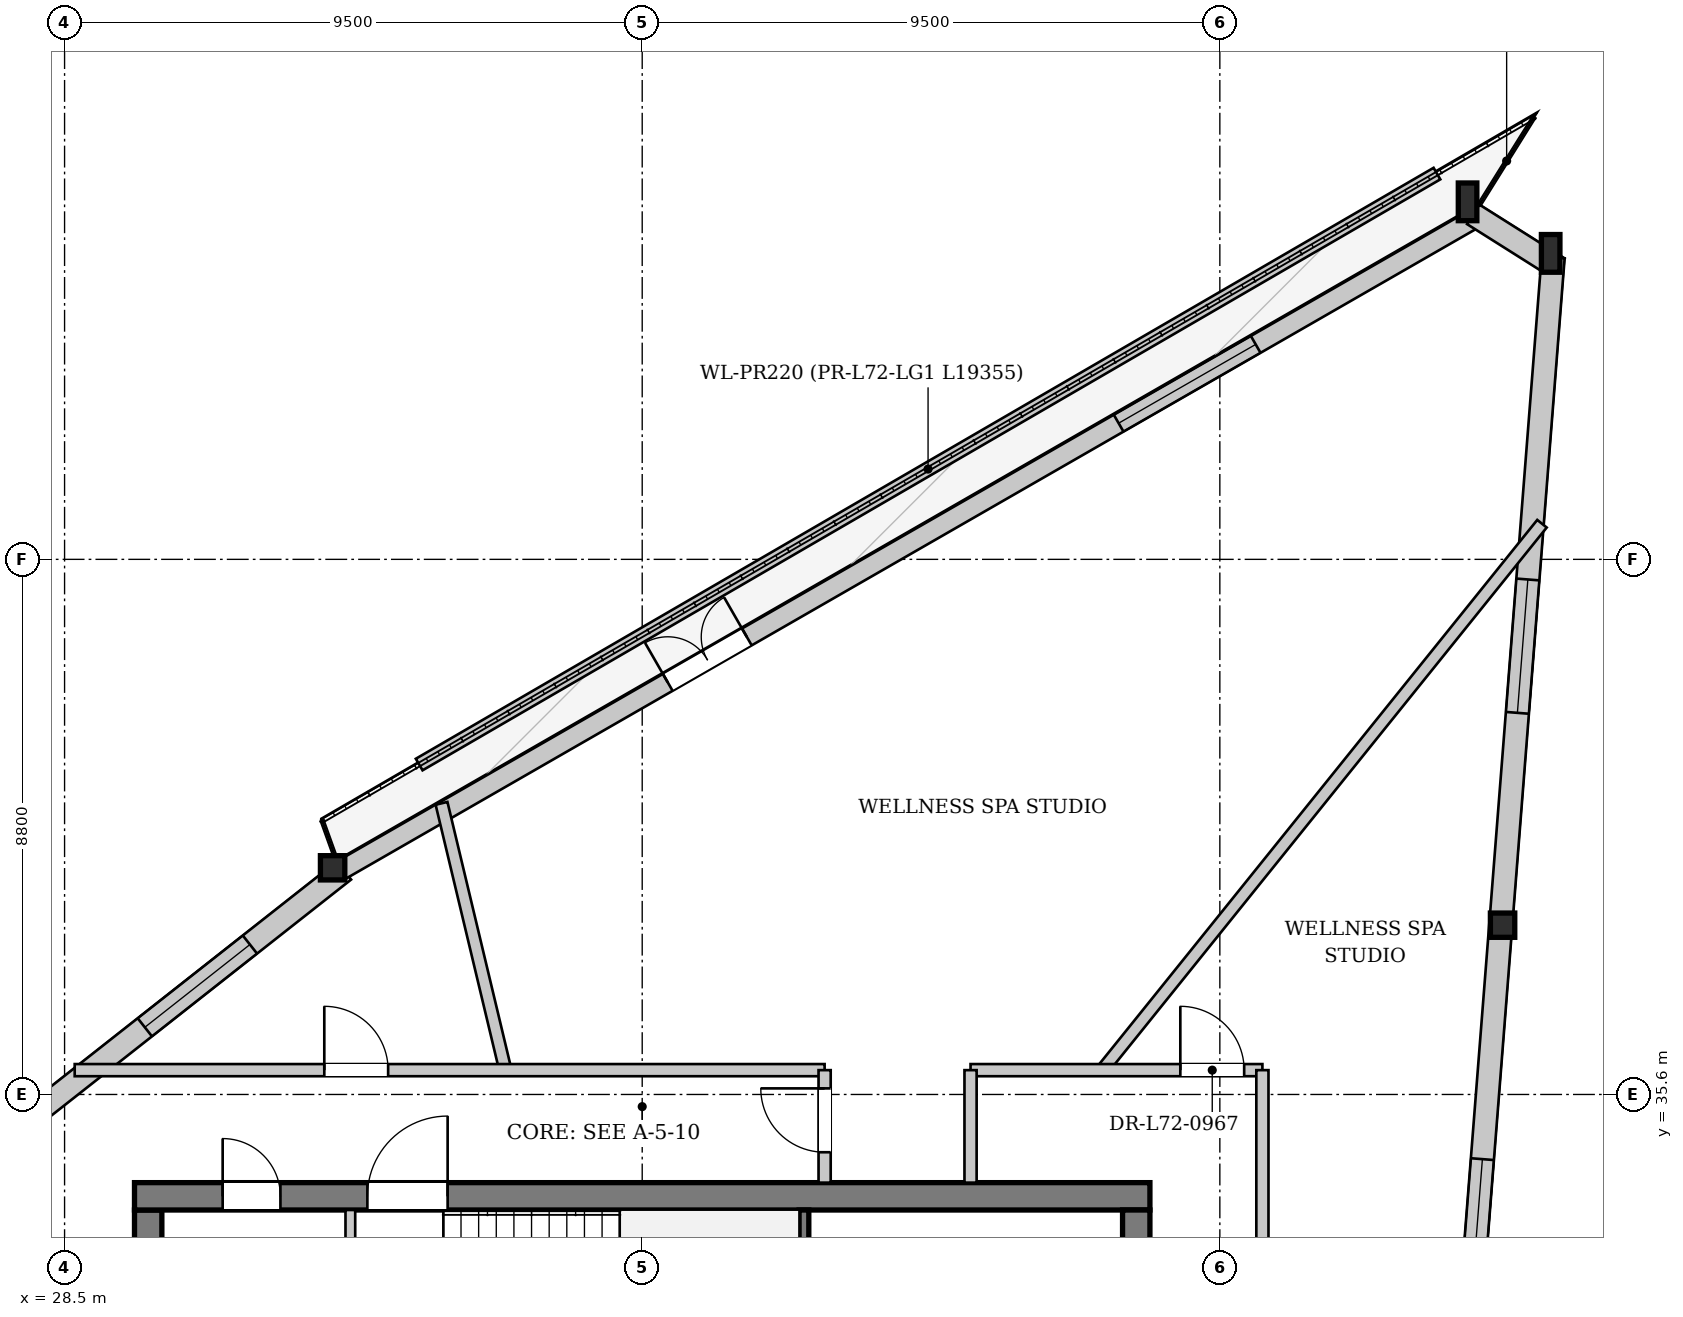
"""IFC4 building model, lengths in metres.
Left out: names, types, materials, properties, quantities, classifications, styles, units other than length and angle.
Written with IfcOpenShell. Run it as: python <this file> out.ifc"""

import sys

from ifc_helpers import new_model, si_unit, direction, frame, frame_2d, origin, origin_2d, place, context, subcontext, project, spatial, rectangle, i_section, extrude, source, transform, mapped, element, fill, save


model = new_model("IFC4")
c1 = context("Model", 3, precision=1e-05, world=origin(), true_north=direction((0.0, 1.0)))
c2 = subcontext(c1, "Body", "Model", "MODEL_VIEW")
j1 = project(units=[si_unit("LENGTHUNIT", "METRE"), si_unit("PLANEANGLEUNIT", "RADIAN")], contexts=[c1])
p1 = place(None, origin())
s1 = spatial("IfcSite", under=j1, at=p1, CompositionType="ELEMENT")
p2 = place(p1, origin())
s2 = spatial("IfcBuilding", under=s1, at=p2, CompositionType="ELEMENT")
p3 = place(p2, frame((0.0, 0.0, 270.5)))
s3 = spatial("IfcBuildingStorey", under=s2, at=p3, CompositionType="ELEMENT", Elevation=270.5)
m1 = source(origin(), c2, "Body", "SweptSolid", [
    extrude(i_section(OverallWidth=0.305, OverallDepth=0.62, WebThickness=0.021, FlangeThickness=0.04, at=origin_2d()), origin(), (0.0, 0.0, 1.0), 3.469),
])
p4 = place(p3, frame((53.17, 49.35, 0.0), z_axis=(-0.132362438107, 0.047146641963, 0.990079481218), x_axis=(-0.335543138669, -0.942024841547, 0.0)))
e1 = element("IfcColumn", 1, at=p4, inside=s3, PredefinedType="COLUMN", context=c2, shape_type="MappedRepresentation", body=[
    mapped(m1, transform((0.0, 0.0, 0.0), x_axis=(1.0, 0.0, 0.0), y_axis=(0.0, 1.0, 0.0), z_axis=(0.0, 0.0, 1.0), scale=1.0)),
])
m2 = source(origin(), c2, "Body", "SweptSolid", [
    extrude(i_section(OverallWidth=0.305, OverallDepth=0.62, WebThickness=0.021, FlangeThickness=0.04, at=origin_2d()), origin(), (0.0, 0.0, 1.0), 3.458),
])
p5 = place(p3, frame((51.769, 50.234, 0.0), z_axis=(-0.112532172855, 0.026121018793, 0.993304687621), x_axis=(-0.226108997979, -0.974102007509, 0.0)))
e2 = element("IfcColumn", 2, at=p5, inside=s3, PredefinedType="COLUMN", context=c2, shape_type="MappedRepresentation", body=[
    mapped(m2, transform((0.0, 0.0, 0.0), x_axis=(1.0, 0.0, 0.0), y_axis=(0.0, 1.0, 0.0), z_axis=(0.0, 0.0, 1.0), scale=1.0)),
])
m3 = source(origin(), c2, "Body", "SweptSolid", [
    extrude(i_section(OverallWidth=0.401, OverallDepth=0.399, WebThickness=0.022, FlangeThickness=0.034, at=origin_2d()), origin(), (0.0, 0.0, 1.0), 3.444),
])
p6 = place(p3, frame((32.978, 39.433, 0.0), z_axis=(-0.040261534601, -0.061030248752, 0.997323577165), x_axis=(0.834725272297, -0.550666614013, 0.0)))
e3 = element("IfcColumn", 3, at=p6, inside=s3, PredefinedType="COLUMN", context=c2, shape_type="MappedRepresentation", body=[
    mapped(m3, transform((0.0, 0.0, 0.0), x_axis=(1.0, 0.0, 0.0), y_axis=(0.0, 1.0, 0.0), z_axis=(0.0, 0.0, 1.0), scale=1.0)),
])
m4 = source(origin(), c2, "Body", "SweptSolid", [
    extrude(i_section(OverallWidth=0.401, OverallDepth=0.399, WebThickness=0.022, FlangeThickness=0.034, at=origin_2d()), origin(), (0.0, 0.0, 1.0), 3.454),
])
p7 = place(p3, frame((52.303, 38.291, 0.0), z_axis=(-0.088644016049, 0.05407709113, 0.994594342752), x_axis=(-0.520788970814, -0.853685450197, 0.0)))
e4 = element("IfcColumn", 4, at=p7, inside=s3, PredefinedType="COLUMN", context=c2, shape_type="MappedRepresentation", body=[
    mapped(m4, transform((0.0, 0.0, 0.0), x_axis=(1.0, 0.0, 0.0), y_axis=(0.0, 1.0, 0.0), z_axis=(0.0, 0.0, 1.0), scale=1.0)),
])
p8 = place(p3, frame((16.066, 25.875, 0.0), z_axis=(0.0, 0.0, 1.0), x_axis=(0.785693730349, 0.61861568206, 0.0)))
e5 = element("IfcWall", 5, at=p8, inside=s3, PredefinedType="SOLIDWALL", context=c2, shape_type="SweptSolid", body=[
    extrude(rectangle(XDim=21.675, YDim=0.38, at=frame_2d((10.837, 0.0))), origin(), (0.0, 0.0, 1.0), 2.872),
])
p9 = place(p8, frame((4.969, 0.0, 0.502)))
e6 = element("IfcOpeningElement", 6, at=p9, cuts=e5, PredefinedType="OPENING", context=c2, shape_type="SweptSolid", body=[
    extrude(rectangle(XDim=2.2, YDim=2.25, at=frame_2d((1.1, 1.125))), frame((0.0, 0.2, 0.0), z_axis=(0.0, -1.0, 0.0), x_axis=(1.0, 0.0, 0.0)), (0.0, 0.0, 1.0), 0.4),
])
p10 = place(p8, frame((17.506, 0.0, 0.502)))
e7 = element("IfcOpeningElement", 7, at=p10, cuts=e5, PredefinedType="OPENING", context=c2, shape_type="SweptSolid", body=[
    extrude(rectangle(XDim=2.2, YDim=2.25, at=frame_2d((1.1, 1.125))), frame((0.0, 0.2, 0.0), z_axis=(0.0, -1.0, 0.0), x_axis=(1.0, 0.0, 0.0)), (0.0, 0.0, 1.0), 0.4),
])
p11 = place(p3, frame((33.057, 39.294, 0.0), z_axis=(0.0, 0.0, 1.0), x_axis=(0.866967626838, 0.49836445902, 0.0)))
e8 = element("IfcWall", 8, at=p11, inside=s3, PredefinedType="SOLIDWALL", context=c2, shape_type="SweptSolid", body=[
    extrude(rectangle(XDim=21.674, YDim=0.32, at=frame_2d((10.837, 0.0))), origin(), (0.0, 0.0, 1.0), 2.872),
])
p12 = place(p11, frame((6.186, 0.0, 0.0)))
e9 = element("IfcOpeningElement", 9, at=p12, cuts=e8, PredefinedType="OPENING", context=c2, shape_type="SweptSolid", body=[
    extrude(rectangle(XDim=1.5, YDim=2.3, at=frame_2d((0.75, 1.15))), frame((0.0, 0.17, 0.0), z_axis=(0.0, -1.0, 0.0), x_axis=(1.0, 0.0, 0.0)), (0.0, 0.0, 1.0), 0.34),
])
p13 = place(p11, frame((14.739, 0.0, 0.402)))
e10 = element("IfcOpeningElement", 10, at=p13, cuts=e8, PredefinedType="OPENING", context=c2, shape_type="SweptSolid", body=[
    extrude(rectangle(XDim=2.6, YDim=2.35, at=frame_2d((1.3, 1.175))), frame((0.0, 0.17, 0.0), z_axis=(0.0, -1.0, 0.0), x_axis=(1.0, 0.0, 0.0)), (0.0, 0.0, 1.0), 0.34),
])
p14 = place(p3, frame((51.667, 50.073, 0.0), z_axis=(0.0, 0.0, 1.0), x_axis=(0.845747848384, -0.533582774229, 0.0)))
e11 = element("IfcWall", 11, at=p14, inside=s3, PredefinedType="SOLIDWALL", context=c2, shape_type="SweptSolid", body=[
    extrude(rectangle(XDim=1.657, YDim=0.38, at=frame_2d((0.829, 0.0))), origin(), (0.0, 0.0, 1.0), 2.872),
])
p15 = place(p3, frame((52.981, 49.365, 0.0), z_axis=(0.0, 0.0, 1.0), x_axis=(-0.078193389746, -0.99693820962, 0.0)))
e12 = element("IfcWall", 12, at=p15, inside=s3, PredefinedType="SOLIDWALL", context=c2, shape_type="SweptSolid", body=[
    extrude(rectangle(XDim=22.187, YDim=0.38, at=frame_2d((11.093, 0.0))), origin(), (0.0, 0.0, 1.0), 2.872),
])
p16 = place(p15, frame((5.312, 0.0, 0.502)))
e13 = element("IfcOpeningElement", 13, at=p16, cuts=e12, PredefinedType="OPENING", context=c2, shape_type="SweptSolid", body=[
    extrude(rectangle(XDim=2.2, YDim=2.25, at=frame_2d((1.1, 1.125))), frame((0.0, 0.2, 0.0), z_axis=(0.0, -1.0, 0.0), x_axis=(1.0, 0.0, 0.0)), (0.0, 0.0, 1.0), 0.4),
])
p17 = place(p15, frame((14.874, 0.0, 0.502)))
e14 = element("IfcOpeningElement", 14, at=p17, cuts=e12, PredefinedType="OPENING", context=c2, shape_type="SweptSolid", body=[
    extrude(rectangle(XDim=2.2, YDim=2.25, at=frame_2d((1.1, 1.125))), frame((0.0, 0.2, 0.0), z_axis=(0.0, -1.0, 0.0), x_axis=(1.0, 0.0, 0.0)), (0.0, 0.0, 1.0), 0.4),
])
p18 = place(p3, frame((51.071, 50.744, 0.0), z_axis=(0.0, 0.0, 1.0), x_axis=(-0.864808735234, -0.502101435433, 0.0)))
e15 = element("IfcWall", 15, at=p18, inside=s3, PredefinedType="PARAPET", context=c2, shape_type="SweptSolid", body=[
    extrude(rectangle(XDim=19.355, YDim=0.22, at=frame_2d((9.678, 0.0))), origin(), (0.0, 0.0, 1.0), 0.3),
])
p19 = place(p3, frame((29.875, 19.5, 0.0), z_axis=(0.0, 0.0, 1.0), x_axis=(0.0, 1.0, 0.0)))
e16 = element("IfcWall", 16, at=p19, inside=s3, PredefinedType="SHEAR", context=c2, shape_type="SweptSolid", body=[
    extrude(rectangle(XDim=14.2, YDim=0.45, at=frame_2d((7.1, 0.0))), origin(), (0.0, 0.0, 1.0), 3.38),
])
p20 = place(p19, frame((7.42, 0.0, 0.0)))
e17 = element("IfcOpeningElement", 17, at=p20, cuts=e16, PredefinedType="OPENING", context=c2, shape_type="SweptSolid", body=[
    extrude(rectangle(XDim=1.6, YDim=2.2, at=frame_2d((0.8, 1.1))), frame((0.0, 0.235, 0.0), z_axis=(0.0, -1.0, 0.0), x_axis=(1.0, 0.0, 0.0)), (0.0, 0.0, 1.0), 0.47),
])
p21 = place(p3, frame((29.65, 33.925, 0.0), z_axis=(0.0, 0.0, 1.0), x_axis=(1.0, 0.0, 0.0)))
e18 = element("IfcWall", 18, at=p21, inside=s3, PredefinedType="SHEAR", context=c2, shape_type="SweptSolid", body=[
    extrude(rectangle(XDim=16.7, YDim=0.45, at=frame_2d((8.35, 0.0))), origin(), (0.0, 0.0, 1.0), 3.38),
])
p22 = place(p21, frame((1.45, 0.0, 0.0)))
e19 = element("IfcOpeningElement", 19, at=p22, cuts=e18, PredefinedType="OPENING", context=c2, shape_type="SweptSolid", body=[
    extrude(rectangle(XDim=0.95, YDim=2.1, at=frame_2d((0.475, 1.05))), frame((0.0, 0.235, 0.0), z_axis=(0.0, -1.0, 0.0), x_axis=(1.0, 0.0, 0.0)), (0.0, 0.0, 1.0), 0.47),
])
p23 = place(p21, frame((3.83, 0.0, 0.0)))
e20 = element("IfcOpeningElement", 20, at=p23, cuts=e18, PredefinedType="OPENING", context=c2, shape_type="SweptSolid", body=[
    extrude(rectangle(XDim=1.32, YDim=2.2, at=frame_2d((0.66, 1.1))), frame((0.0, 0.235, 0.0), z_axis=(0.0, -1.0, 0.0), x_axis=(1.0, 0.0, 0.0)), (0.0, 0.0, 1.0), 0.47),
])
p24 = place(p3, frame((46.125, 33.7, 0.0), z_axis=(0.0, 0.0, 1.0), x_axis=(0.0, -1.0, 0.0)))
e21 = element("IfcWall", 21, at=p24, inside=s3, PredefinedType="SHEAR", context=c2, shape_type="SweptSolid", body=[
    extrude(rectangle(XDim=14.2, YDim=0.45, at=frame_2d((7.1, 0.0))), origin(), (0.0, 0.0, 1.0), 3.38),
])
p25 = place(p24, frame((5.18, 0.0, 0.0)))
e22 = element("IfcOpeningElement", 22, at=p25, cuts=e21, PredefinedType="OPENING", context=c2, shape_type="SweptSolid", body=[
    extrude(rectangle(XDim=1.6, YDim=2.2, at=frame_2d((0.8, 1.1))), frame((0.0, 0.235, 0.0), z_axis=(0.0, -1.0, 0.0), x_axis=(1.0, 0.0, 0.0)), (0.0, 0.0, 1.0), 0.47),
])
p26 = place(p24, frame((2.05, 0.0, 0.0)))
e23 = element("IfcOpeningElement", 23, at=p26, cuts=e21, PredefinedType="OPENING", context=c2, shape_type="SweptSolid", body=[
    extrude(rectangle(XDim=0.95, YDim=2.1, at=frame_2d((0.475, 1.05))), frame((0.0, 0.235, 0.0), z_axis=(0.0, -1.0, 0.0), x_axis=(1.0, 0.0, 0.0)), (0.0, 0.0, 1.0), 0.47),
])
p27 = place(p3, frame((40.66, 30.6, 0.0), z_axis=(0.0, 0.0, 1.0), x_axis=(0.0, 1.0, 0.0)))
e24 = element("IfcWall", 24, at=p27, inside=s3, PredefinedType="PARTITIONING", context=c2, shape_type="SweptSolid", body=[
    extrude(rectangle(XDim=3.1, YDim=0.16, at=frame_2d((1.55, 0.0))), origin(), (0.0, 0.0, 1.0), 3.38),
])
p28 = place(p3, frame((33.2, 28.44, 0.0), z_axis=(0.0, 0.0, 1.0), x_axis=(0.0, 1.0, 0.0)))
e25 = element("IfcWall", 25, at=p28, inside=s3, PredefinedType="PARTITIONING", context=c2, shape_type="SweptSolid", body=[
    extrude(rectangle(XDim=5.26, YDim=0.16, at=frame_2d((2.63, 0.0))), origin(), (0.0, 0.0, 1.0), 3.38),
])
p29 = place(p3, frame((45.565, 36.0, 0.0), z_axis=(0.0, 0.0, 1.0), x_axis=(0.626997187815, 0.779021518619, 0.0)))
e26 = element("IfcWall", 26, at=p29, inside=s3, PredefinedType="PARTITIONING", context=c2, shape_type="SweptSolid", body=[
    extrude(rectangle(XDim=11.535, YDim=0.2, at=frame_2d((5.768, 0.0))), origin(), (0.0, 0.0, 1.0), 3.38),
])
p30 = place(p3, frame((35.75, 36.0, 0.0), z_axis=(0.0, 0.0, 1.0), x_axis=(-0.232846936367, 0.972513395396, 0.0)))
e27 = element("IfcWall", 27, at=p30, inside=s3, PredefinedType="PARTITIONING", context=c2, shape_type="SweptSolid", body=[
    extrude(rectangle(XDim=4.512, YDim=0.2, at=frame_2d((2.256, 0.0))), origin(), (0.0, 0.0, 1.0), 3.38),
])
p31 = place(p3, frame((28.667, 36.0, 0.0), z_axis=(0.0, 0.0, 1.0), x_axis=(1.0, 0.0, 0.0)))
e28 = element("IfcWall", 28, at=p31, inside=s3, PredefinedType="PARTITIONING", context=c2, shape_type="SweptSolid", body=[
    extrude(rectangle(XDim=12.333, YDim=0.2, at=frame_2d((6.167, 0.0))), origin(), (0.0, 0.0, 1.0), 3.38),
])
p32 = place(p31, frame((4.105, 0.0, 0.0)))
e29 = element("IfcOpeningElement", 29, at=p32, cuts=e28, PredefinedType="OPENING", context=c2, shape_type="SweptSolid", body=[
    extrude(rectangle(XDim=1.05, YDim=2.2, at=frame_2d((0.525, 1.1))), frame((0.0, 0.11, 0.0), z_axis=(0.0, -1.0, 0.0), x_axis=(1.0, 0.0, 0.0)), (0.0, 0.0, 1.0), 0.22),
])
p33 = place(p3, frame((41.0, 34.15, 0.0), z_axis=(0.0, 0.0, 1.0), x_axis=(0.0, 1.0, 0.0)))
e30 = element("IfcWall", 30, at=p33, inside=s3, PredefinedType="PARTITIONING", context=c2, shape_type="SweptSolid", body=[
    extrude(rectangle(XDim=1.85, YDim=0.2, at=frame_2d((0.925, 0.0))), origin(), (0.0, 0.0, 1.0), 3.38),
])
p34 = place(p33, frame((0.5, 0.0, 0.0)))
e31 = element("IfcOpeningElement", 31, at=p34, cuts=e30, PredefinedType="OPENING", context=c2, shape_type="SweptSolid", body=[
    extrude(rectangle(XDim=1.05, YDim=2.2, at=frame_2d((0.525, 1.1))), frame((0.0, 0.11, 0.0), z_axis=(0.0, -1.0, 0.0), x_axis=(1.0, 0.0, 0.0)), (0.0, 0.0, 1.0), 0.22),
])
p35 = place(p3, frame((43.4, 36.0, 0.0), z_axis=(0.0, 0.0, 1.0), x_axis=(1.0, 0.0, 0.0)))
e32 = element("IfcWall", 32, at=p35, inside=s3, PredefinedType="PARTITIONING", context=c2, shape_type="SweptSolid", body=[
    extrude(rectangle(XDim=4.8, YDim=0.2, at=frame_2d((2.4, 0.0))), origin(), (0.0, 0.0, 1.0), 3.38),
])
p36 = place(p35, frame((3.45, 0.0, 0.0)))
e33 = element("IfcOpeningElement", 33, at=p36, cuts=e32, PredefinedType="OPENING", context=c2, shape_type="SweptSolid", body=[
    extrude(rectangle(XDim=1.05, YDim=2.2, at=frame_2d((0.525, 1.1))), frame((0.0, 0.11, 0.0), z_axis=(0.0, -1.0, 0.0), x_axis=(1.0, 0.0, 0.0)), (0.0, 0.0, 1.0), 0.22),
])
p37 = place(p3, frame((43.4, 34.15, 0.0), z_axis=(0.0, 0.0, 1.0), x_axis=(0.0, 1.0, 0.0)))
e34 = element("IfcWall", 34, at=p37, inside=s3, PredefinedType="PARTITIONING", context=c2, shape_type="SweptSolid", body=[
    extrude(rectangle(XDim=1.85, YDim=0.2, at=frame_2d((0.925, 0.0))), origin(), (0.0, 0.0, 1.0), 3.055),
])
p38 = place(p3, frame((48.2, 17.2, 0.0), z_axis=(0.0, 0.0, 1.0), x_axis=(0.0, 1.0, 0.0)))
e35 = element("IfcWall", 35, at=p38, inside=s3, PredefinedType="PARTITIONING", context=c2, shape_type="SweptSolid", body=[
    extrude(rectangle(XDim=18.8, YDim=0.2, at=frame_2d((9.4, 0.0))), origin(), (0.0, 0.0, 1.0), 3.125),
])
m5 = source(origin(), c2, "Body", "SweptSolid", [
    extrude(rectangle(XDim=2.2, YDim=2.25, at=frame_2d((1.1, 1.125))), frame((0.0, 0.03, 0.0), z_axis=(0.0, -1.0, 0.0), x_axis=(1.0, 0.0, 0.0)), (0.0, 0.0, 1.0), 0.06),
])
p39 = place(p10, origin())
e36 = element("IfcWindow", 36, at=p39, inside=s3, PartitioningType="SINGLE_PANEL", PredefinedType="WINDOW", context=c2, shape_type="MappedRepresentation", body=[
    mapped(m5, transform((0.0, 0.0, 0.0), x_axis=(1.0, 0.0, 0.0), y_axis=(0.0, 1.0, 0.0), z_axis=(0.0, 0.0, 1.0), scale=1.0)),
])
fill(e7, e36)
m6 = source(origin(), c2, "Body", "SweptSolid", [
    extrude(rectangle(XDim=1.5, YDim=2.3, at=frame_2d((0.75, 1.15))), frame((0.0, 0.025, 0.0), z_axis=(0.0, -1.0, 0.0), x_axis=(1.0, 0.0, 0.0)), (0.0, 0.0, 1.0), 0.05),
])
p40 = place(p12, origin())
e37 = element("IfcDoor", 37, at=p40, inside=s3, OperationType="DOUBLE_DOOR_SINGLE_SWING", PredefinedType="DOOR", context=c2, shape_type="MappedRepresentation", body=[
    mapped(m6, transform((0.0, 0.0, 0.0), x_axis=(1.0, 0.0, 0.0), y_axis=(0.0, 1.0, 0.0), z_axis=(0.0, 0.0, 1.0), scale=1.0)),
])
fill(e9, e37)
m7 = source(origin(), c2, "Body", "SweptSolid", [
    extrude(rectangle(XDim=2.6, YDim=2.35, at=frame_2d((1.3, 1.175))), frame((0.0, 0.03, 0.0), z_axis=(0.0, -1.0, 0.0), x_axis=(1.0, 0.0, 0.0)), (0.0, 0.0, 1.0), 0.06),
])
p41 = place(p13, origin())
e38 = element("IfcWindow", 38, at=p41, inside=s3, PartitioningType="SINGLE_PANEL", PredefinedType="WINDOW", context=c2, shape_type="MappedRepresentation", body=[
    mapped(m7, transform((0.0, 0.0, 0.0), x_axis=(1.0, 0.0, 0.0), y_axis=(0.0, 1.0, 0.0), z_axis=(0.0, 0.0, 1.0), scale=1.0)),
])
fill(e10, e38)
p42 = place(p16, origin())
e39 = element("IfcWindow", 39, at=p42, inside=s3, PartitioningType="SINGLE_PANEL", PredefinedType="WINDOW", context=c2, shape_type="MappedRepresentation", body=[
    mapped(m5, transform((0.0, 0.0, 0.0), x_axis=(1.0, 0.0, 0.0), y_axis=(0.0, 1.0, 0.0), z_axis=(0.0, 0.0, 1.0), scale=1.0)),
])
fill(e13, e39)
p43 = place(p17, origin())
e40 = element("IfcWindow", 40, at=p43, inside=s3, PartitioningType="SINGLE_PANEL", PredefinedType="WINDOW", context=c2, shape_type="MappedRepresentation", body=[
    mapped(m5, transform((0.0, 0.0, 0.0), x_axis=(1.0, 0.0, 0.0), y_axis=(0.0, 1.0, 0.0), z_axis=(0.0, 0.0, 1.0), scale=1.0)),
])
fill(e14, e40)
m8 = source(origin(), c2, "Body", "SweptSolid", [
    extrude(rectangle(XDim=0.95, YDim=2.1, at=frame_2d((0.475, 1.05))), frame((0.0, 0.025, 0.0), z_axis=(0.0, -1.0, 0.0), x_axis=(1.0, 0.0, 0.0)), (0.0, 0.0, 1.0), 0.05),
])
p44 = place(p22, origin())
e41 = element("IfcDoor", 41, at=p44, inside=s3, OperationType="SINGLE_SWING_LEFT", PredefinedType="DOOR", context=c2, shape_type="MappedRepresentation", body=[
    mapped(m8, transform((0.0, 0.0, 0.0), x_axis=(1.0, 0.0, 0.0), y_axis=(0.0, 1.0, 0.0), z_axis=(0.0, 0.0, 1.0), scale=1.0)),
])
fill(e19, e41)
m9 = source(origin(), c2, "Body", "SweptSolid", [
    extrude(rectangle(XDim=1.32, YDim=2.2, at=frame_2d((0.66, 1.1))), frame((0.0, 0.025, 0.0), z_axis=(0.0, -1.0, 0.0), x_axis=(1.0, 0.0, 0.0)), (0.0, 0.0, 1.0), 0.05),
])
p45 = place(p23, origin())
e42 = element("IfcDoor", 42, at=p45, inside=s3, OperationType="SINGLE_SWING_RIGHT", PredefinedType="DOOR", context=c2, shape_type="MappedRepresentation", body=[
    mapped(m9, transform((0.0, 0.0, 0.0), x_axis=(1.0, 0.0, 0.0), y_axis=(0.0, 1.0, 0.0), z_axis=(0.0, 0.0, 1.0), scale=1.0)),
])
fill(e20, e42)
m10 = source(origin(), c2, "Body", "SweptSolid", [
    extrude(rectangle(XDim=1.05, YDim=2.2, at=frame_2d((0.525, 1.1))), frame((0.0, 0.025, 0.0), z_axis=(0.0, -1.0, 0.0), x_axis=(1.0, 0.0, 0.0)), (0.0, 0.0, 1.0), 0.05),
])
p46 = place(p32, origin())
e43 = element("IfcDoor", 43, at=p46, inside=s3, OperationType="SINGLE_SWING_LEFT", PredefinedType="DOOR", context=c2, shape_type="MappedRepresentation", body=[
    mapped(m10, transform((0.0, 0.0, 0.0), x_axis=(1.0, 0.0, 0.0), y_axis=(0.0, 1.0, 0.0), z_axis=(0.0, 0.0, 1.0), scale=1.0)),
])
fill(e29, e43)
p47 = place(p34, origin())
e44 = element("IfcDoor", 44, at=p47, inside=s3, OperationType="SINGLE_SWING_RIGHT", PredefinedType="DOOR", context=c2, shape_type="MappedRepresentation", body=[
    mapped(m10, transform((0.0, 0.0, 0.0), x_axis=(1.0, 0.0, 0.0), y_axis=(0.0, 1.0, 0.0), z_axis=(0.0, 0.0, 1.0), scale=1.0)),
])
fill(e31, e44)
p48 = place(p36, origin())
e45 = element("IfcDoor", 45, at=p48, inside=s3, OperationType="SINGLE_SWING_LEFT", PredefinedType="DOOR", context=c2, shape_type="MappedRepresentation", body=[
    mapped(m10, transform((0.0, 0.0, 0.0), x_axis=(1.0, 0.0, 0.0), y_axis=(0.0, 1.0, 0.0), z_axis=(0.0, 0.0, 1.0), scale=1.0)),
])
fill(e33, e45)
save(model, sys.argv[1])
